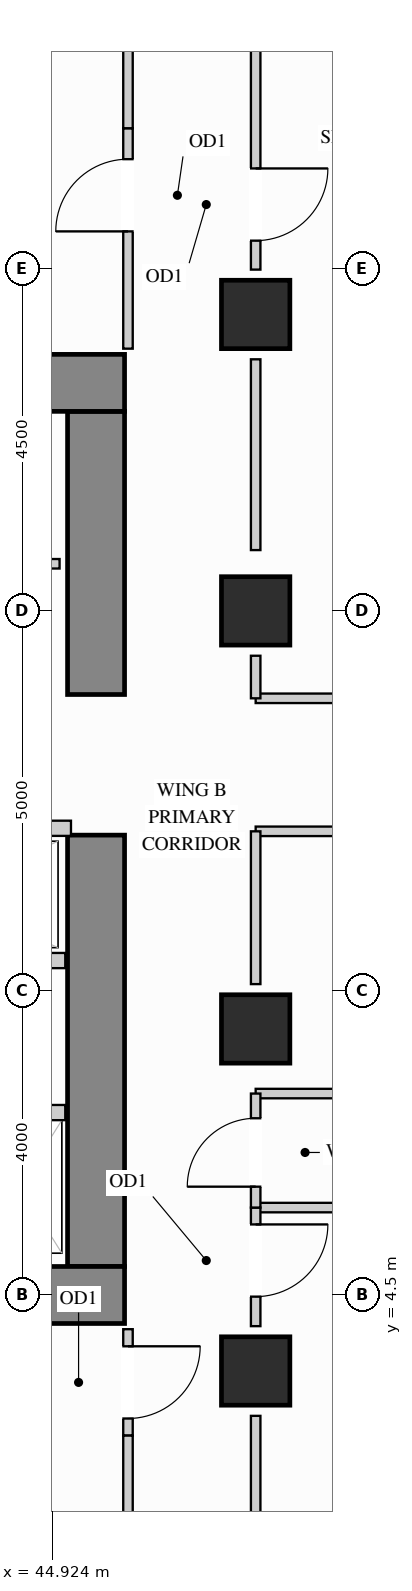
"""IFC4 building model, lengths in metres.
Left out: names, types, materials, properties, quantities, classifications, styles, units other than length and angle.
Written with IfcOpenShell. Run it as: python <this file> out.ifc"""

import sys

from ifc_helpers import new_model, si_unit, direction, frame, frame_2d, origin, origin_2d, place, context, subcontext, project, spatial, rectangle, extrude, source, transform, mapped, element, fill, save


model = new_model("IFC4")
c1 = context("Model", 3, precision=1e-05, world=origin(), true_north=direction((0.0, 1.0)))
c2 = subcontext(c1, "Body", "Model", "MODEL_VIEW")
j1 = project(units=[si_unit("LENGTHUNIT", "METRE"), si_unit("PLANEANGLEUNIT", "RADIAN")], contexts=[c1])
p1 = place(None, origin())
s1 = spatial("IfcSite", under=j1, at=p1, CompositionType="ELEMENT")
p2 = place(p1, origin())
s2 = spatial("IfcBuilding", under=s1, at=p2, CompositionType="ELEMENT")
p3 = place(p2, frame((0.0, 0.0, 102.6)))
s3 = spatial("IfcBuildingStorey", under=s2, at=p3, CompositionType="ELEMENT", Elevation=102.6)
m1 = source(origin(), c2, "Body", "SweptSolid", [
    extrude(rectangle(XDim=0.9, YDim=0.9, at=origin_2d()), origin(), (0.0, 0.0, 1.0), 3.38),
])
for number, where, z_axis, x_axis in (
    (1, (47.6, 13.5, 0.0), (0.0, 0.0, 1.0), (1.0, 0.0, 0.0)),
    (2, (47.6, 3.5, 0.0), (0.0, 0.0, 1.0), (1.0, 0.0, 0.0)),
    (3, (47.6, 8.0, 0.0), (0.0, 0.0, 1.0), (1.0, 0.0, 0.0)),
    (4, (47.6, 17.4, 0.0), (0.0, 0.0, 1.0), (1.0, 0.0, 0.0)),
):
    element("IfcColumn", number, at=place(p3, frame(where, z_axis=z_axis, x_axis=x_axis)), inside=s3, PredefinedType="COLUMN", context=c2, shape_type="MappedRepresentation", body=[
        mapped(m1, transform((0.0, 0.0, 0.0), x_axis=(1.0, 0.0, 0.0), y_axis=(0.0, 1.0, 0.0), z_axis=(0.0, 0.0, 1.0))),
    ])
m2 = source(origin(), c2, "Body", "SweptSolid", [
    extrude(rectangle(XDim=5.675, YDim=0.75, at=frame_2d((2.837, 0.0))), origin(), (0.0, 0.0, 1.0), 3.38),
])
p4 = place(p3, frame((45.5, 4.875, 0.0), z_axis=(0.0, 0.0, 1.0), x_axis=(0.0, 1.0, 0.0)))
e5 = element("IfcWall", 5, at=p4, inside=s3, PredefinedType="SHEAR", context=c2, shape_type="MappedRepresentation", body=[
    mapped(m2, transform((0.0, 0.0, 0.0), x_axis=(1.0, 0.0, 0.0), y_axis=(0.0, 1.0, 0.0), z_axis=(0.0, 0.0, 1.0))),
])
m3 = source(origin(), c2, "Body", "SweptSolid", [
    extrude(rectangle(XDim=3.725, YDim=0.75, at=frame_2d((1.863, 0.0))), origin(), (0.0, 0.0, 1.0), 3.38),
])
p5 = place(p3, frame((45.5, 12.4, 0.0), z_axis=(0.0, 0.0, 1.0), x_axis=(0.0, 1.0, 0.0)))
e6 = element("IfcWall", 6, at=p5, inside=s3, PredefinedType="SHEAR", context=c2, shape_type="MappedRepresentation", body=[
    mapped(m3, transform((0.0, 0.0, 0.0), x_axis=(1.0, 0.0, 0.0), y_axis=(0.0, 1.0, 0.0), z_axis=(0.0, 0.0, 1.0))),
])
m4 = source(origin(), c2, "Body", "SweptSolid", [
    extrude(rectangle(XDim=10.25, YDim=0.75, at=frame_2d((5.125, 0.0))), origin(), (0.0, 0.0, 1.0), 3.38),
])
for number, where, z_axis, x_axis in (
    (7, (35.625, 16.5, 0.0), (0.0, 0.0, 1.0), (1.0, 0.0, 0.0)),
    (8, (35.625, 4.5, 0.0), (0.0, 0.0, 1.0), (1.0, 0.0, 0.0)),
):
    element("IfcWall", number, at=place(p3, frame(where, z_axis=z_axis, x_axis=x_axis)), inside=s3, PredefinedType="SHEAR", context=c2, shape_type="MappedRepresentation", body=[
        mapped(m4, transform((0.0, 0.0, 0.0), x_axis=(1.0, 0.0, 0.0), y_axis=(0.0, 1.0, 0.0), z_axis=(0.0, 0.0, 1.0))),
    ])
p6 = place(p3, frame((36.5, 14.12, 0.0), z_axis=(0.0, 0.0, 1.0), x_axis=(1.0, 0.0, 0.0)))
e9 = element("IfcWall", 9, at=p6, inside=s3, PredefinedType="PARTITIONING", context=c2, shape_type="SweptSolid", body=[
    extrude(rectangle(XDim=8.52, YDim=0.125, at=frame_2d((4.26, 0.0))), origin(), (0.0, 0.0, 1.0), 3.365),
])
p7 = place(p6, frame((3.785, 0.0, 0.0)))
e10 = element("IfcOpeningElement", 10, at=p7, cuts=e9, PredefinedType="OPENING", context=c2, shape_type="SweptSolid", body=[
    extrude(rectangle(XDim=0.95, YDim=2.15, at=frame_2d((0.475, 1.075))), frame((0.0, 0.073, 0.0), z_axis=(0.0, -1.0, 0.0), x_axis=(1.0, 0.0, 0.0)), (0.0, 0.0, 1.0), 0.145),
])
m5 = source(origin(), c2, "Body", "SweptSolid", [
    extrude(rectangle(XDim=8.048, YDim=0.125, at=frame_2d((4.024, 0.0))), origin(), (0.0, 0.0, 1.0), 3.365),
])
for number, where, z_axis, x_axis in (
    (11, (47.6, 5.65, 0.0), (0.0, 0.0, 1.0), (1.0, 0.0, 0.0)),
    (12, (47.6, 7.15, 0.0), (0.0, 0.0, 1.0), (1.0, 0.0, 0.0)),
):
    element("IfcWall", number, at=place(p3, frame(where, z_axis=z_axis, x_axis=x_axis)), inside=s3, PredefinedType="PARTITIONING", context=c2, shape_type="MappedRepresentation", body=[
        mapped(m5, transform((0.0, 0.0, 0.0), x_axis=(1.0, 0.0, 0.0), y_axis=(0.0, 1.0, 0.0), z_axis=(0.0, 0.0, 1.0))),
    ])
m6 = source(origin(), c2, "Body", "SweptSolid", [
    extrude(rectangle(XDim=3.8, YDim=0.125, at=frame_2d((1.9, 0.0))), origin(), (0.0, 0.0, 1.0), 3.365),
])
p8 = place(p3, frame((47.6, 12.35, 0.0), z_axis=(0.0, 0.0, 1.0), x_axis=(1.0, 0.0, 0.0)))
e13 = element("IfcWall", 13, at=p8, inside=s3, PredefinedType="PARTITIONING", context=c2, shape_type="MappedRepresentation", body=[
    mapped(m6, transform((0.0, 0.0, 0.0), x_axis=(1.0, 0.0, 0.0), y_axis=(0.0, 1.0, 0.0), z_axis=(0.0, 0.0, 1.0))),
])
p9 = place(p3, frame((47.6, 10.6, 0.0), z_axis=(0.0, 0.0, 1.0), x_axis=(1.0, 0.0, 0.0)))
e14 = element("IfcWall", 14, at=p9, inside=s3, PredefinedType="PARTITIONING", context=c2, shape_type="SweptSolid", body=[
    extrude(rectangle(XDim=3.8, YDim=0.125, at=frame_2d((1.9, 0.0))), origin(), (0.0, 0.0, 1.0), 2.677),
])
p10 = place(p9, frame((1.425, 0.0, 0.0)))
e15 = element("IfcOpeningElement", 15, at=p10, cuts=e14, PredefinedType="OPENING", context=c2, shape_type="SweptSolid", body=[
    extrude(rectangle(XDim=0.95, YDim=2.15, at=frame_2d((0.475, 1.075))), frame((0.0, 0.073, 0.0), z_axis=(0.0, -1.0, 0.0), x_axis=(1.0, 0.0, 0.0)), (0.0, 0.0, 1.0), 0.145),
])
p11 = place(p3, frame((47.6, 4.09, 0.0), z_axis=(0.0, 0.0, 1.0), x_axis=(0.0, 1.0, 0.0)))
e16 = element("IfcWall", 16, at=p11, inside=s3, PredefinedType="PARTITIONING", context=c2, shape_type="SweptSolid", body=[
    extrude(rectangle(XDim=1.56, YDim=0.125, at=frame_2d((0.78, 0.0))), origin(), (0.0, 0.0, 1.0), 2.677),
])
p12 = place(p11, frame((0.388, 0.0, 0.0)))
e17 = element("IfcOpeningElement", 17, at=p12, cuts=e16, PredefinedType="OPENING", context=c2, shape_type="SweptSolid", body=[
    extrude(rectangle(XDim=0.95, YDim=2.15, at=frame_2d((0.475, 1.075))), frame((0.0, 0.073, 0.0), z_axis=(0.0, -1.0, 0.0), x_axis=(1.0, 0.0, 0.0)), (0.0, 0.0, 1.0), 0.145),
])
m7 = source(origin(), c2, "Body", "SweptSolid", [
    extrude(rectangle(XDim=1.72, YDim=0.125, at=frame_2d((0.86, 0.0))), origin(), (0.0, 0.0, 1.0), 2.677),
])
p13 = place(p3, frame((47.6, 1.19, 0.0), z_axis=(0.0, 0.0, 1.0), x_axis=(0.0, 1.0, 0.0)))
e18 = element("IfcWall", 18, at=p13, inside=s3, PredefinedType="PARTITIONING", context=c2, shape_type="MappedRepresentation", body=[
    mapped(m7, transform((0.0, 0.0, 0.0), x_axis=(1.0, 0.0, 0.0), y_axis=(0.0, 1.0, 0.0), z_axis=(0.0, 0.0, 1.0))),
])
m8 = source(origin(), c2, "Body", "SweptSolid", [
    extrude(rectangle(XDim=2.01, YDim=0.125, at=frame_2d((1.005, 0.0))), origin(), (0.0, 0.0, 1.0), 2.677),
])
p14 = place(p3, frame((47.6, 8.59, 0.0), z_axis=(0.0, 0.0, 1.0), x_axis=(0.0, 1.0, 0.0)))
e19 = element("IfcWall", 19, at=p14, inside=s3, PredefinedType="PARTITIONING", context=c2, shape_type="MappedRepresentation", body=[
    mapped(m8, transform((0.0, 0.0, 0.0), x_axis=(1.0, 0.0, 0.0), y_axis=(0.0, 1.0, 0.0), z_axis=(0.0, 0.0, 1.0))),
])
m9 = source(origin(), c2, "Body", "SweptSolid", [
    extrude(rectangle(XDim=2.51, YDim=0.125, at=frame_2d((1.255, 0.0))), origin(), (0.0, 0.0, 1.0), 2.677),
])
p15 = place(p3, frame((47.6, 14.3, 0.0), z_axis=(0.0, 0.0, 1.0), x_axis=(0.0, 1.0, 0.0)))
e20 = element("IfcWall", 20, at=p15, inside=s3, PredefinedType="PARTITIONING", context=c2, shape_type="MappedRepresentation", body=[
    mapped(m9, transform((0.0, 0.0, 0.0), x_axis=(1.0, 0.0, 0.0), y_axis=(0.0, 1.0, 0.0), z_axis=(0.0, 0.0, 1.0))),
])
p16 = place(p3, frame((47.6, 17.99, 0.0), z_axis=(0.0, 0.0, 1.0), x_axis=(0.0, 1.0, 0.0)))
e21 = element("IfcWall", 21, at=p16, inside=s3, PredefinedType="PARTITIONING", context=c2, shape_type="SweptSolid", body=[
    extrude(rectangle(XDim=3.32, YDim=0.125, at=frame_2d((1.66, 0.0))), origin(), (0.0, 0.0, 1.0), 2.677),
])
p17 = place(p16, frame((0.381, 0.0, 0.0)))
e22 = element("IfcOpeningElement", 22, at=p17, cuts=e21, PredefinedType="OPENING", context=c2, shape_type="SweptSolid", body=[
    extrude(rectangle(XDim=0.95, YDim=2.15, at=frame_2d((0.475, 1.075))), frame((0.0, 0.073, 0.0), z_axis=(0.0, -1.0, 0.0), x_axis=(1.0, 0.0, 0.0)), (0.0, 0.0, 1.0), 0.145),
])
m10 = source(origin(), c2, "Body", "SweptSolid", [
    extrude(rectangle(XDim=0.56, YDim=0.125, at=frame_2d((0.28, 0.0))), origin(), (0.0, 0.0, 1.0), 2.677),
])
p18 = place(p3, frame((47.6, 12.35, 0.0), z_axis=(0.0, 0.0, 1.0), x_axis=(0.0, 1.0, 0.0)))
e23 = element("IfcWall", 23, at=p18, inside=s3, PredefinedType="PARTITIONING", context=c2, shape_type="MappedRepresentation", body=[
    mapped(m10, transform((0.0, 0.0, 0.0), x_axis=(1.0, 0.0, 0.0), y_axis=(0.0, 1.0, 0.0), z_axis=(0.0, 0.0, 1.0))),
])
p19 = place(p3, frame((47.6, 5.65, 0.0), z_axis=(0.0, 0.0, 1.0), x_axis=(0.0, 1.0, 0.0)))
e24 = element("IfcWall", 24, at=p19, inside=s3, PredefinedType="PARTITIONING", context=c2, shape_type="SweptSolid", body=[
    extrude(rectangle(XDim=1.5, YDim=0.125, at=frame_2d((0.75, 0.0))), origin(), (0.0, 0.0, 1.0), 2.677),
])
p20 = place(p19, frame((0.275, 0.0, 0.0)))
e25 = element("IfcOpeningElement", 25, at=p20, cuts=e24, PredefinedType="OPENING", context=c2, shape_type="SweptSolid", body=[
    extrude(rectangle(XDim=0.9, YDim=2.15, at=frame_2d((0.45, 1.075))), frame((0.0, 0.073, 0.0), z_axis=(0.0, -1.0, 0.0), x_axis=(1.0, 0.0, 0.0)), (0.0, 0.0, 1.0), 0.145),
])
p21 = place(p3, frame((45.92, 16.95, 0.0), z_axis=(0.0, 0.0, 1.0), x_axis=(0.0, 1.0, 0.0)))
e26 = element("IfcWall", 26, at=p21, inside=s3, PredefinedType="PARTITIONING", context=c2, shape_type="SweptSolid", body=[
    extrude(rectangle(XDim=2.9, YDim=0.125, at=frame_2d((1.45, 0.0))), origin(), (0.0, 0.0, 1.0), 3.365),
])
p22 = place(p21, frame((1.543, 0.0, 0.0)))
e27 = element("IfcOpeningElement", 27, at=p22, cuts=e26, PredefinedType="OPENING", context=c2, shape_type="SweptSolid", body=[
    extrude(rectangle(XDim=0.95, YDim=2.15, at=frame_2d((0.475, 1.075))), frame((0.0, 0.073, 0.0), z_axis=(0.0, -1.0, 0.0), x_axis=(1.0, 0.0, 0.0)), (0.0, 0.0, 1.0), 0.145),
])
m11 = source(origin(), c2, "Body", "SweptSolid", [
    extrude(rectangle(XDim=2.298, YDim=0.125, at=frame_2d((1.149, 0.0))), origin(), (0.0, 0.0, 1.0), 3.365),
])
p23 = place(p3, frame((45.92, 19.85, 0.0), z_axis=(0.0, 0.0, 1.0), x_axis=(0.0, 1.0, 0.0)))
e28 = element("IfcWall", 28, at=p23, inside=s3, PredefinedType="PARTITIONING", context=c2, shape_type="MappedRepresentation", body=[
    mapped(m11, transform((0.0, 0.0, 0.0), x_axis=(1.0, 0.0, 0.0), y_axis=(0.0, 1.0, 0.0), z_axis=(0.0, 0.0, 1.0))),
])
p24 = place(p3, frame((45.92, 2.65, 0.0), z_axis=(0.0, 0.0, 1.0), x_axis=(0.0, 1.0, 0.0)))
e29 = element("IfcWall", 29, at=p24, inside=s3, PredefinedType="PARTITIONING", context=c2, shape_type="SweptSolid", body=[
    extrude(rectangle(XDim=1.4, YDim=0.125, at=frame_2d((0.7, 0.0))), origin(), (0.0, 0.0, 1.0), 3.365),
])
p25 = place(p24, frame((0.225, 0.0, 0.0)))
e30 = element("IfcOpeningElement", 30, at=p25, cuts=e29, PredefinedType="OPENING", context=c2, shape_type="SweptSolid", body=[
    extrude(rectangle(XDim=0.95, YDim=2.15, at=frame_2d((0.475, 1.075))), frame((0.0, 0.073, 0.0), z_axis=(0.0, -1.0, 0.0), x_axis=(1.0, 0.0, 0.0)), (0.0, 0.0, 1.0), 0.145),
])
p26 = place(p3, frame((45.92, 0.352, 0.0), z_axis=(0.0, 0.0, 1.0), x_axis=(0.0, 1.0, 0.0)))
e31 = element("IfcWall", 31, at=p26, inside=s3, PredefinedType="PARTITIONING", context=c2, shape_type="MappedRepresentation", body=[
    mapped(m11, transform((0.0, 0.0, 0.0), x_axis=(1.0, 0.0, 0.0), y_axis=(0.0, 1.0, 0.0), z_axis=(0.0, 0.0, 1.0))),
])
m12 = source(origin(), c2, "Body", "SweptSolid", [
    extrude(rectangle(XDim=1.245, YDim=0.2, at=frame_2d((0.623, 0.0))), origin(), (0.0, 0.0, 1.0), 3.365),
])
p27 = place(p3, frame((43.85, 6.9, 0.0), z_axis=(0.0, 0.0, 1.0), x_axis=(1.0, 0.0, 0.0)))
e32 = element("IfcWall", 32, at=p27, inside=s3, PredefinedType="PARTITIONING", context=c2, shape_type="MappedRepresentation", body=[
    mapped(m12, transform((0.0, 0.0, 0.0), x_axis=(1.0, 0.0, 0.0), y_axis=(0.0, 1.0, 0.0), z_axis=(0.0, 0.0, 1.0))),
])
m13 = source(origin(), c2, "Body", "SweptSolid", [
    extrude(rectangle(XDim=3.49, YDim=0.2, at=frame_2d((1.745, 0.0))), origin(), (0.0, 0.0, 1.0), 3.365),
])
p28 = place(p3, frame((41.68, 10.64, 0.0), z_axis=(0.0, 0.0, 1.0), x_axis=(1.0, 0.0, 0.0)))
e33 = element("IfcWall", 33, at=p28, inside=s3, PredefinedType="PARTITIONING", context=c2, shape_type="MappedRepresentation", body=[
    mapped(m13, transform((0.0, 0.0, 0.0), x_axis=(1.0, 0.0, 0.0), y_axis=(0.0, 1.0, 0.0), z_axis=(0.0, 0.0, 1.0))),
])
m14 = source(origin(), c2, "Body", "SweptSolid", [
    extrude(rectangle(XDim=3.415, YDim=0.2, at=frame_2d((1.708, 0.0))), origin(), (0.0, 0.0, 1.0), 3.365),
])
p29 = place(p3, frame((41.68, 8.9, 0.0), z_axis=(0.0, 0.0, 1.0), x_axis=(1.0, 0.0, 0.0)))
e34 = element("IfcWall", 34, at=p29, inside=s3, PredefinedType="PARTITIONING", context=c2, shape_type="MappedRepresentation", body=[
    mapped(m14, transform((0.0, 0.0, 0.0), x_axis=(1.0, 0.0, 0.0), y_axis=(0.0, 1.0, 0.0), z_axis=(0.0, 0.0, 1.0))),
])
m15 = source(origin(), c2, "Body", "SweptSolid", [
    extrude(rectangle(XDim=0.95, YDim=2.15, at=frame_2d((0.475, 1.075))), frame((0.0, 0.025, 0.0), z_axis=(0.0, -1.0, 0.0), x_axis=(1.0, 0.0, 0.0)), (0.0, 0.0, 1.0), 0.05),
])
p30 = place(p22, origin())
e35 = element("IfcDoor", 35, at=p30, inside=s3, OperationType="SINGLE_SWING_LEFT", PredefinedType="DOOR", context=c2, shape_type="MappedRepresentation", body=[
    mapped(m15, transform((0.0, 0.0, 0.0), x_axis=(1.0, 0.0, 0.0), y_axis=(0.0, 1.0, 0.0), z_axis=(0.0, 0.0, 1.0))),
])
fill(e27, e35)
p31 = place(p25, origin())
e36 = element("IfcDoor", 36, at=p31, inside=s3, OperationType="SINGLE_SWING_RIGHT", PredefinedType="DOOR", context=c2, shape_type="MappedRepresentation", body=[
    mapped(m15, transform((0.0, 0.0, 0.0), x_axis=(1.0, 0.0, 0.0), y_axis=(0.0, 1.0, 0.0), z_axis=(0.0, 0.0, 1.0))),
])
fill(e30, e36)
p32 = place(p12, origin())
e37 = element("IfcDoor", 37, at=p32, inside=s3, OperationType="SINGLE_SWING_RIGHT", PredefinedType="DOOR", context=c2, shape_type="MappedRepresentation", body=[
    mapped(m15, transform((0.0, 0.0, 0.0), x_axis=(1.0, 0.0, 0.0), y_axis=(0.0, 1.0, 0.0), z_axis=(0.0, 0.0, 1.0))),
])
fill(e17, e37)
p33 = place(p17, origin())
e38 = element("IfcDoor", 38, at=p33, inside=s3, OperationType="SINGLE_SWING_RIGHT", PredefinedType="DOOR", context=c2, shape_type="MappedRepresentation", body=[
    mapped(m15, transform((0.0, 0.0, 0.0), x_axis=(1.0, 0.0, 0.0), y_axis=(0.0, 1.0, 0.0), z_axis=(0.0, 0.0, 1.0))),
])
fill(e22, e38)
m16 = source(origin(), c2, "Body", "SweptSolid", [
    extrude(rectangle(XDim=0.9, YDim=2.15, at=frame_2d((0.45, 1.075))), frame((0.0, 0.025, 0.0), z_axis=(0.0, -1.0, 0.0), x_axis=(1.0, 0.0, 0.0)), (0.0, 0.0, 1.0), 0.05),
])
p34 = place(p20, origin())
e39 = element("IfcDoor", 39, at=p34, inside=s3, OperationType="SINGLE_SWING_LEFT", PredefinedType="DOOR", context=c2, shape_type="MappedRepresentation", body=[
    mapped(m16, transform((0.0, 0.0, 0.0), x_axis=(1.0, 0.0, 0.0), y_axis=(0.0, 1.0, 0.0), z_axis=(0.0, 0.0, 1.0))),
])
fill(e25, e39)
save(model, sys.argv[1])
